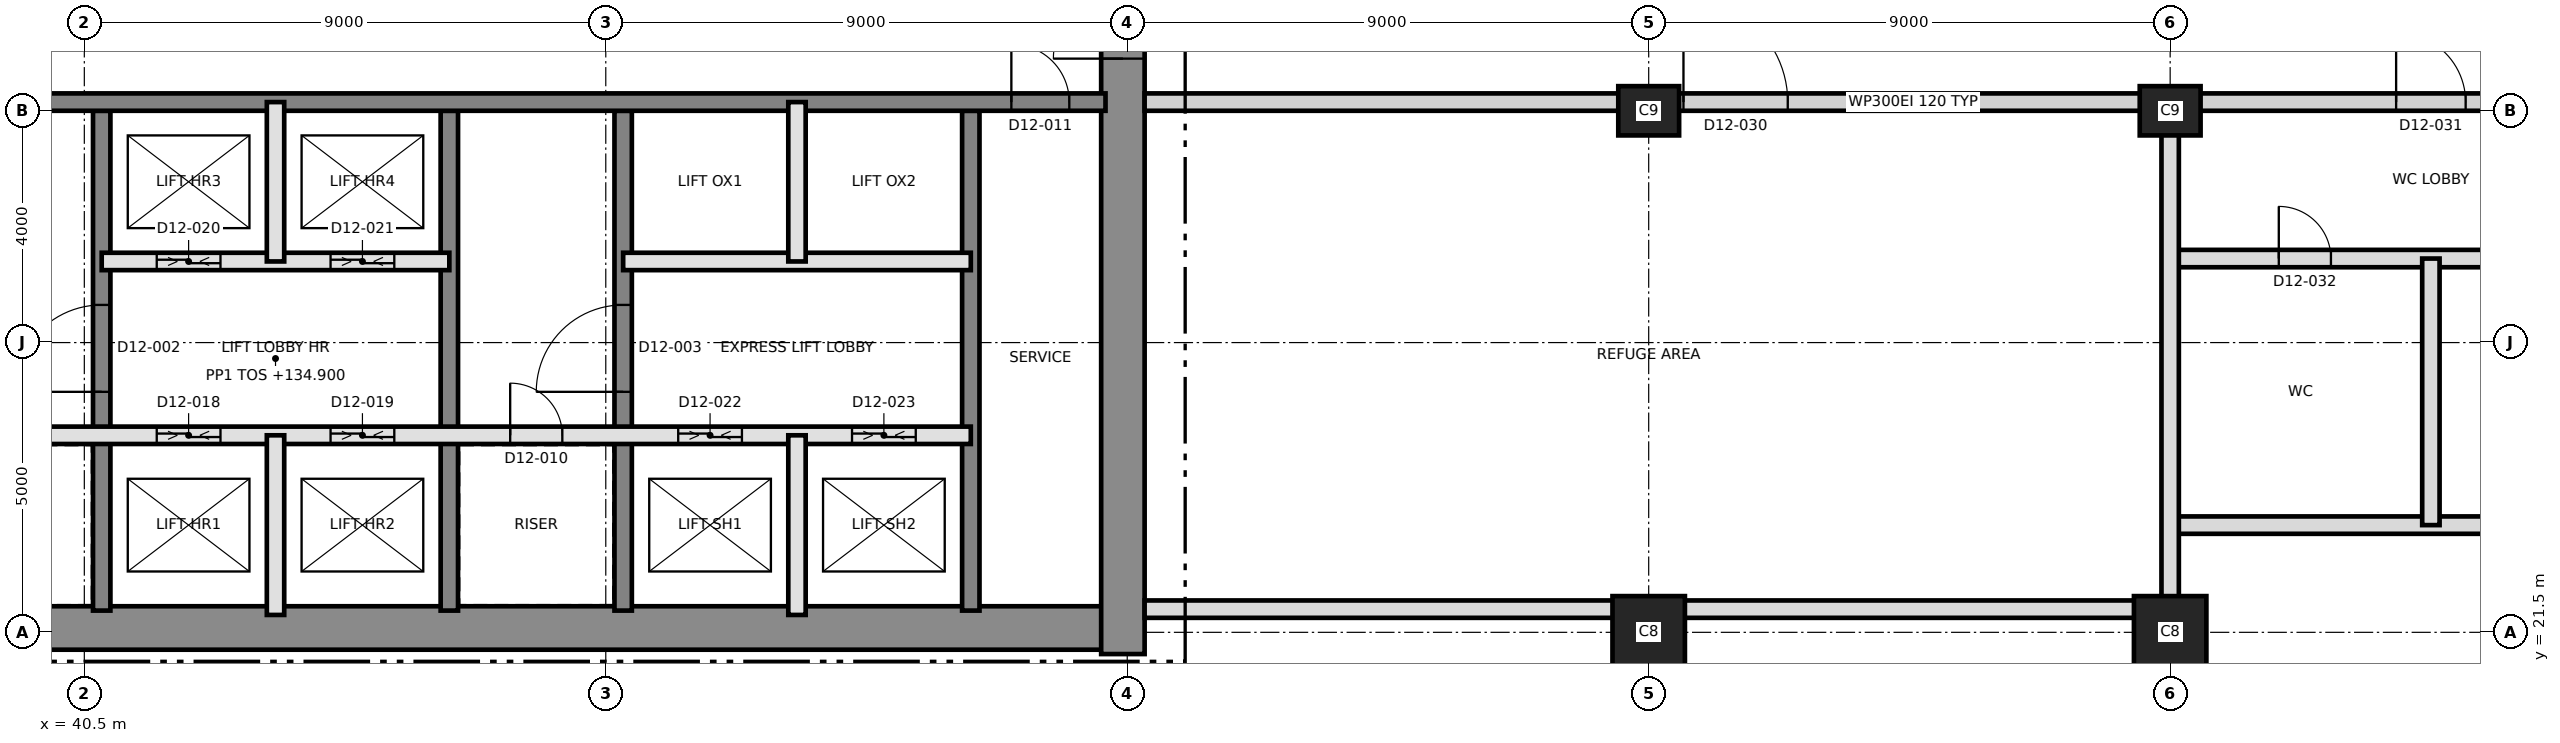
"""IFC4 building model, lengths in metres.
Left out: names, types, materials, properties, quantities, classifications, styles, units other than length and angle.
Written with IfcOpenShell. Run it as: python <this file> out.ifc"""

import sys

from ifc_helpers import new_model, si_unit, direction, frame, frame_2d, origin, origin_2d, place, context, subcontext, project, spatial, rectangle, extrude, element, fill, save


model = new_model("IFC4")
c1 = context("Model", 3, precision=1e-05, world=origin(), true_north=direction((0.0, 1.0)))
c2 = subcontext(c1, "Body", "Model", "MODEL_VIEW")
j1 = project(units=[si_unit("LENGTHUNIT", "METRE"), si_unit("PLANEANGLEUNIT", "RADIAN")], contexts=[c1])
p1 = place(None, origin())
s1 = spatial("IfcSite", under=j1, at=p1, CompositionType="ELEMENT")
p2 = place(p1, origin())
s2 = spatial("IfcBuilding", under=s1, at=p2, CompositionType="ELEMENT")
p3 = place(p2, frame((0.0, 0.0, 135.2)))
s3 = spatial("IfcBuildingStorey", under=s2, at=p3, CompositionType="ELEMENT", Elevation=135.2)
p4 = place(p3, frame((31.125, 21.575, 0.0), z_axis=(0.0, 0.0, 1.0), x_axis=(1.0, 0.0, 0.0)))
e1 = element("IfcWall", 1, at=p4, inside=s3, PredefinedType="SHEAR", context=c2, shape_type="SweptSolid", body=[
    extrude(rectangle(XDim=27.0, YDim=0.75, at=frame_2d((13.5, 0.0))), origin(), (0.0, 0.0, 1.0), 7.0),
])
p5 = place(p3, frame((58.425, 21.125, 0.0), z_axis=(0.0, 0.0, 1.0), x_axis=(0.0, 1.0, 0.0)))
e2 = element("IfcWall", 2, at=p5, inside=s3, PredefinedType="SHEAR", context=c2, shape_type="SweptSolid", body=[
    extrude(rectangle(XDim=18.75, YDim=0.75, at=frame_2d((9.375, 0.0))), origin(), (0.0, 0.0, 1.0), 7.0),
])
p6 = place(p5, frame((10.275, 0.0, 0.0)))
e3 = element("IfcOpeningElement", 3, at=p6, cuts=e2, PredefinedType="OPENING", context=c2, shape_type="SweptSolid", body=[
    extrude(rectangle(XDim=1.2, YDim=2.1, at=frame_2d((0.6, 1.05))), frame((0.0, 0.385, 0.0), z_axis=(0.0, -1.0, 0.0), x_axis=(1.0, 0.0, 0.0)), (0.0, 0.0, 1.0), 0.77),
])
p7 = place(p3, frame((40.8, 21.875, 0.0), z_axis=(0.0, 0.0, 1.0), x_axis=(0.0, 1.0, 0.0)))
e4 = element("IfcWall", 4, at=p7, inside=s3, PredefinedType="SHEAR", context=c2, shape_type="SweptSolid", body=[
    extrude(rectangle(XDim=8.625, YDim=0.3, at=frame_2d((4.312, 0.0))), origin(), (0.0, 0.0, 1.0), 7.0),
])
p8 = place(p7, frame((3.775, 0.0, 0.0)))
e5 = element("IfcOpeningElement", 5, at=p8, cuts=e4, PredefinedType="OPENING", context=c2, shape_type="SweptSolid", body=[
    extrude(rectangle(XDim=1.5, YDim=2.1, at=frame_2d((0.75, 1.05))), frame((0.0, 0.16, 0.0), z_axis=(0.0, -1.0, 0.0), x_axis=(1.0, 0.0, 0.0)), (0.0, 0.0, 1.0), 0.32),
])
p9 = place(p3, frame((46.8, 21.875, 0.0), z_axis=(0.0, 0.0, 1.0), x_axis=(0.0, 1.0, 0.0)))
e6 = element("IfcWall", 6, at=p9, inside=s3, PredefinedType="SHEAR", context=c2, shape_type="SweptSolid", body=[
    extrude(rectangle(XDim=8.625, YDim=0.3, at=frame_2d((4.312, 0.0))), origin(), (0.0, 0.0, 1.0), 7.0),
])
p10 = place(p3, frame((49.8, 21.875, 0.0), z_axis=(0.0, 0.0, 1.0), x_axis=(0.0, 1.0, 0.0)))
e7 = element("IfcWall", 7, at=p10, inside=s3, PredefinedType="SHEAR", context=c2, shape_type="SweptSolid", body=[
    extrude(rectangle(XDim=8.625, YDim=0.3, at=frame_2d((4.312, 0.0))), origin(), (0.0, 0.0, 1.0), 7.0),
])
p11 = place(p10, frame((3.775, 0.0, 0.0)))
e8 = element("IfcOpeningElement", 8, at=p11, cuts=e7, PredefinedType="OPENING", context=c2, shape_type="SweptSolid", body=[
    extrude(rectangle(XDim=1.5, YDim=2.1, at=frame_2d((0.75, 1.05))), frame((0.0, 0.16, 0.0), z_axis=(0.0, -1.0, 0.0), x_axis=(1.0, 0.0, 0.0)), (0.0, 0.0, 1.0), 0.32),
])
p12 = place(p3, frame((55.8, 21.875, 0.0), z_axis=(0.0, 0.0, 1.0), x_axis=(0.0, 1.0, 0.0)))
e9 = element("IfcWall", 9, at=p12, inside=s3, PredefinedType="SHEAR", context=c2, shape_type="SweptSolid", body=[
    extrude(rectangle(XDim=8.625, YDim=0.3, at=frame_2d((4.312, 0.0))), origin(), (0.0, 0.0, 1.0), 7.0),
])
p13 = place(p3, frame((31.875, 30.65, 0.0), z_axis=(0.0, 0.0, 1.0), x_axis=(1.0, 0.0, 0.0)))
e10 = element("IfcWall", 10, at=p13, inside=s3, PredefinedType="SHEAR", context=c2, shape_type="SweptSolid", body=[
    extrude(rectangle(XDim=26.25, YDim=0.3, at=frame_2d((13.125, 0.0))), origin(), (0.0, 0.0, 1.0), 7.0),
])
p14 = place(p13, frame((24.625, 0.0, 0.0)))
e11 = element("IfcOpeningElement", 11, at=p14, cuts=e10, PredefinedType="OPENING", context=c2, shape_type="SweptSolid", body=[
    extrude(rectangle(XDim=1.0, YDim=2.1, at=frame_2d((0.5, 1.05))), frame((0.0, 0.16, 0.0), z_axis=(0.0, -1.0, 0.0), x_axis=(1.0, 0.0, 0.0)), (0.0, 0.0, 1.0), 0.32),
])
for number, where, z_axis, x_axis in (
    (12, (67.5, 21.5, 0.0), (0.0, 0.0, 1.0), (1.0, 0.0, 0.0)),
    (13, (76.5, 21.5, 0.0), (0.0, 0.0, 1.0), (1.0, 0.0, 0.0)),
):
    element("IfcColumn", number, at=place(p3, frame(where, z_axis=z_axis, x_axis=x_axis)), inside=s3, PredefinedType="COLUMN", context=c2, shape_type="SweptSolid", body=[
        extrude(rectangle(XDim=1.25, YDim=1.25, at=origin_2d()), origin(), (0.0, 0.0, 1.0), 7.0),
    ])
for number, where, z_axis, x_axis in (
    (14, (67.5, 30.5, 0.0), (0.0, 0.0, 1.0), (1.0, 0.0, 0.0)),
    (15, (76.5, 30.5, 0.0), (0.0, 0.0, 1.0), (1.0, 0.0, 0.0)),
):
    element("IfcColumn", number, at=place(p3, frame(where, z_axis=z_axis, x_axis=x_axis)), inside=s3, PredefinedType="COLUMN", context=c2, shape_type="SweptSolid", body=[
        extrude(rectangle(XDim=1.05, YDim=0.85, at=origin_2d()), origin(), (0.0, 0.0, 1.0), 7.0),
    ])
p15 = place(p3, frame((31.8, 24.9, 0.0), z_axis=(0.0, 0.0, 1.0), x_axis=(1.0, 0.0, 0.0)))
e16 = element("IfcWall", 16, at=p15, inside=s3, PredefinedType="SOLIDWALL", context=c2, shape_type="SweptSolid", body=[
    extrude(rectangle(XDim=24.0, YDim=0.3, at=frame_2d((12.0, 0.0))), origin(), (0.0, 0.0, 1.0), 6.7),
])
p16 = place(p15, frame((7.05, 0.0, 0.0)))
e17 = element("IfcOpeningElement", 17, at=p16, cuts=e16, PredefinedType="OPENING", context=c2, shape_type="SweptSolid", body=[
    extrude(rectangle(XDim=0.9, YDim=2.1, at=frame_2d((0.45, 1.05))), frame((0.0, 0.16, 0.0), z_axis=(0.0, -1.0, 0.0), x_axis=(1.0, 0.0, 0.0)), (0.0, 0.0, 1.0), 0.32),
])
p17 = place(p15, frame((16.05, 0.0, 0.0)))
e18 = element("IfcOpeningElement", 18, at=p17, cuts=e16, PredefinedType="OPENING", context=c2, shape_type="SweptSolid", body=[
    extrude(rectangle(XDim=0.9, YDim=2.1, at=frame_2d((0.45, 1.05))), frame((0.0, 0.16, 0.0), z_axis=(0.0, -1.0, 0.0), x_axis=(1.0, 0.0, 0.0)), (0.0, 0.0, 1.0), 0.32),
])
p18 = place(p15, frame((0.95, 0.0, 0.0)))
e19 = element("IfcOpeningElement", 19, at=p18, cuts=e16, PredefinedType="OPENING", context=c2, shape_type="SweptSolid", body=[
    extrude(rectangle(XDim=1.1, YDim=2.4, at=frame_2d((0.55, 1.2))), frame((0.0, 0.16, 0.0), z_axis=(0.0, -1.0, 0.0), x_axis=(1.0, 0.0, 0.0)), (0.0, 0.0, 1.0), 0.32),
])
p19 = place(p15, frame((3.95, 0.0, 0.0)))
e20 = element("IfcOpeningElement", 20, at=p19, cuts=e16, PredefinedType="OPENING", context=c2, shape_type="SweptSolid", body=[
    extrude(rectangle(XDim=1.1, YDim=2.4, at=frame_2d((0.55, 1.2))), frame((0.0, 0.16, 0.0), z_axis=(0.0, -1.0, 0.0), x_axis=(1.0, 0.0, 0.0)), (0.0, 0.0, 1.0), 0.32),
])
p20 = place(p15, frame((9.95, 0.0, 0.0)))
e21 = element("IfcOpeningElement", 21, at=p20, cuts=e16, PredefinedType="OPENING", context=c2, shape_type="SweptSolid", body=[
    extrude(rectangle(XDim=1.1, YDim=2.4, at=frame_2d((0.55, 1.2))), frame((0.0, 0.16, 0.0), z_axis=(0.0, -1.0, 0.0), x_axis=(1.0, 0.0, 0.0)), (0.0, 0.0, 1.0), 0.32),
])
p21 = place(p15, frame((12.95, 0.0, 0.0)))
e22 = element("IfcOpeningElement", 22, at=p21, cuts=e16, PredefinedType="OPENING", context=c2, shape_type="SweptSolid", body=[
    extrude(rectangle(XDim=1.1, YDim=2.4, at=frame_2d((0.55, 1.2))), frame((0.0, 0.16, 0.0), z_axis=(0.0, -1.0, 0.0), x_axis=(1.0, 0.0, 0.0)), (0.0, 0.0, 1.0), 0.32),
])
p22 = place(p15, frame((18.95, 0.0, 0.0)))
e23 = element("IfcOpeningElement", 23, at=p22, cuts=e16, PredefinedType="OPENING", context=c2, shape_type="SweptSolid", body=[
    extrude(rectangle(XDim=1.1, YDim=2.4, at=frame_2d((0.55, 1.2))), frame((0.0, 0.16, 0.0), z_axis=(0.0, -1.0, 0.0), x_axis=(1.0, 0.0, 0.0)), (0.0, 0.0, 1.0), 0.32),
])
p23 = place(p15, frame((21.95, 0.0, 0.0)))
e24 = element("IfcOpeningElement", 24, at=p23, cuts=e16, PredefinedType="OPENING", context=c2, shape_type="SweptSolid", body=[
    extrude(rectangle(XDim=1.1, YDim=2.4, at=frame_2d((0.55, 1.2))), frame((0.0, 0.16, 0.0), z_axis=(0.0, -1.0, 0.0), x_axis=(1.0, 0.0, 0.0)), (0.0, 0.0, 1.0), 0.32),
])
p24 = place(p3, frame((40.8, 27.9, 0.0), z_axis=(0.0, 0.0, 1.0), x_axis=(1.0, 0.0, 0.0)))
e25 = element("IfcWall", 25, at=p24, inside=s3, PredefinedType="SOLIDWALL", context=c2, shape_type="SweptSolid", body=[
    extrude(rectangle(XDim=6.0, YDim=0.3, at=frame_2d((3.0, 0.0))), origin(), (0.0, 0.0, 1.0), 6.7),
])
p25 = place(p24, frame((0.95, 0.0, 0.0)))
e26 = element("IfcOpeningElement", 26, at=p25, cuts=e25, PredefinedType="OPENING", context=c2, shape_type="SweptSolid", body=[
    extrude(rectangle(XDim=1.1, YDim=2.4, at=frame_2d((0.55, 1.2))), frame((0.0, 0.16, 0.0), z_axis=(0.0, -1.0, 0.0), x_axis=(1.0, 0.0, 0.0)), (0.0, 0.0, 1.0), 0.32),
])
p26 = place(p24, frame((3.95, 0.0, 0.0)))
e27 = element("IfcOpeningElement", 27, at=p26, cuts=e25, PredefinedType="OPENING", context=c2, shape_type="SweptSolid", body=[
    extrude(rectangle(XDim=1.1, YDim=2.4, at=frame_2d((0.55, 1.2))), frame((0.0, 0.16, 0.0), z_axis=(0.0, -1.0, 0.0), x_axis=(1.0, 0.0, 0.0)), (0.0, 0.0, 1.0), 0.32),
])
p27 = place(p3, frame((49.8, 27.9, 0.0), z_axis=(0.0, 0.0, 1.0), x_axis=(1.0, 0.0, 0.0)))
e28 = element("IfcWall", 28, at=p27, inside=s3, PredefinedType="SOLIDWALL", context=c2, shape_type="SweptSolid", body=[
    extrude(rectangle(XDim=6.0, YDim=0.3, at=frame_2d((3.0, 0.0))), origin(), (0.0, 0.0, 1.0), 6.7),
])
p28 = place(p3, frame((43.8, 21.8, 0.0), z_axis=(0.0, 0.0, 1.0), x_axis=(0.0, 1.0, 0.0)))
e29 = element("IfcWall", 29, at=p28, inside=s3, PredefinedType="SOLIDWALL", context=c2, shape_type="SweptSolid", body=[
    extrude(rectangle(XDim=3.1, YDim=0.3, at=frame_2d((1.55, 0.0))), origin(), (0.0, 0.0, 1.0), 6.7),
])
p29 = place(p3, frame((43.8, 27.9, 0.0), z_axis=(0.0, 0.0, 1.0), x_axis=(0.0, 1.0, 0.0)))
e30 = element("IfcWall", 30, at=p29, inside=s3, PredefinedType="SOLIDWALL", context=c2, shape_type="SweptSolid", body=[
    extrude(rectangle(XDim=2.75, YDim=0.3, at=frame_2d((1.375, 0.0))), origin(), (0.0, 0.0, 1.0), 6.7),
])
p30 = place(p3, frame((52.8, 21.8, 0.0), z_axis=(0.0, 0.0, 1.0), x_axis=(0.0, 1.0, 0.0)))
e31 = element("IfcWall", 31, at=p30, inside=s3, PredefinedType="SOLIDWALL", context=c2, shape_type="SweptSolid", body=[
    extrude(rectangle(XDim=3.1, YDim=0.3, at=frame_2d((1.55, 0.0))), origin(), (0.0, 0.0, 1.0), 6.7),
])
p31 = place(p3, frame((52.8, 27.9, 0.0), z_axis=(0.0, 0.0, 1.0), x_axis=(0.0, 1.0, 0.0)))
e32 = element("IfcWall", 32, at=p31, inside=s3, PredefinedType="SOLIDWALL", context=c2, shape_type="SweptSolid", body=[
    extrude(rectangle(XDim=2.75, YDim=0.3, at=frame_2d((1.375, 0.0))), origin(), (0.0, 0.0, 1.0), 6.7),
])
p32 = place(p3, frame((58.8, 21.9, 0.0), z_axis=(0.0, 0.0, 1.0), x_axis=(1.0, 0.0, 0.0)))
e33 = element("IfcWall", 33, at=p32, inside=s3, PredefinedType="PARTITIONING", context=c2, shape_type="SweptSolid", body=[
    extrude(rectangle(XDim=17.7, YDim=0.3, at=frame_2d((8.85, 0.0))), origin(), (0.0, 0.0, 1.0), 6.7),
])
p33 = place(p3, frame((76.5, 23.35, 0.0), z_axis=(0.0, 0.0, 1.0), x_axis=(1.0, 0.0, 0.0)))
e34 = element("IfcWall", 34, at=p33, inside=s3, PredefinedType="PARTITIONING", context=c2, shape_type="SweptSolid", body=[
    extrude(rectangle(XDim=8.83, YDim=0.3, at=frame_2d((4.415, 0.0))), origin(), (0.0, 0.0, 1.0), 6.7),
])
p34 = place(p3, frame((76.5, 27.95, 0.0), z_axis=(0.0, 0.0, 1.0), x_axis=(1.0, 0.0, 0.0)))
e35 = element("IfcWall", 35, at=p34, inside=s3, PredefinedType="PARTITIONING", context=c2, shape_type="SweptSolid", body=[
    extrude(rectangle(XDim=8.83, YDim=0.3, at=frame_2d((4.415, 0.0))), origin(), (0.0, 0.0, 1.0), 6.7),
])
p35 = place(p34, frame((1.875, 0.0, 0.0)))
e36 = element("IfcOpeningElement", 36, at=p35, cuts=e35, PredefinedType="OPENING", context=c2, shape_type="SweptSolid", body=[
    extrude(rectangle(XDim=0.9, YDim=2.1, at=frame_2d((0.45, 1.05))), frame((0.0, 0.16, 0.0), z_axis=(0.0, -1.0, 0.0), x_axis=(1.0, 0.0, 0.0)), (0.0, 0.0, 1.0), 0.32),
])
p36 = place(p34, frame((6.225, 0.0, 0.0)))
e37 = element("IfcOpeningElement", 37, at=p36, cuts=e35, PredefinedType="OPENING", context=c2, shape_type="SweptSolid", body=[
    extrude(rectangle(XDim=0.9, YDim=2.1, at=frame_2d((0.45, 1.05))), frame((0.0, 0.16, 0.0), z_axis=(0.0, -1.0, 0.0), x_axis=(1.0, 0.0, 0.0)), (0.0, 0.0, 1.0), 0.32),
])
p37 = place(p3, frame((58.8, 30.65, 0.0), z_axis=(0.0, 0.0, 1.0), x_axis=(1.0, 0.0, 0.0)))
e38 = element("IfcWall", 38, at=p37, inside=s3, PredefinedType="PARTITIONING", context=c2, shape_type="SweptSolid", body=[
    extrude(rectangle(XDim=26.53, YDim=0.3, at=frame_2d((13.265, 0.0))), origin(), (0.0, 0.0, 1.0), 6.7),
])
p38 = place(p37, frame((9.3, 0.0, 0.0)))
e39 = element("IfcOpeningElement", 39, at=p38, cuts=e38, PredefinedType="OPENING", context=c2, shape_type="SweptSolid", body=[
    extrude(rectangle(XDim=1.8, YDim=2.1, at=frame_2d((0.9, 1.05))), frame((0.0, 0.16, 0.0), z_axis=(0.0, -1.0, 0.0), x_axis=(1.0, 0.0, 0.0)), (0.0, 0.0, 1.0), 0.32),
])
p39 = place(p37, frame((21.6, 0.0, 0.0)))
e40 = element("IfcOpeningElement", 40, at=p39, cuts=e38, PredefinedType="OPENING", context=c2, shape_type="SweptSolid", body=[
    extrude(rectangle(XDim=1.2, YDim=2.1, at=frame_2d((0.6, 1.05))), frame((0.0, 0.16, 0.0), z_axis=(0.0, -1.0, 0.0), x_axis=(1.0, 0.0, 0.0)), (0.0, 0.0, 1.0), 0.32),
])
p40 = place(p3, frame((76.5, 21.9, 0.0), z_axis=(0.0, 0.0, 1.0), x_axis=(0.0, 1.0, 0.0)))
e41 = element("IfcWall", 41, at=p40, inside=s3, PredefinedType="PARTITIONING", context=c2, shape_type="SweptSolid", body=[
    extrude(rectangle(XDim=8.75, YDim=0.3, at=frame_2d((4.375, 0.0))), origin(), (0.0, 0.0, 1.0), 6.7),
])
p41 = place(p3, frame((81.0, 23.35, 0.0), z_axis=(0.0, 0.0, 1.0), x_axis=(0.0, 1.0, 0.0)))
e42 = element("IfcWall", 42, at=p41, inside=s3, PredefinedType="PARTITIONING", context=c2, shape_type="SweptSolid", body=[
    extrude(rectangle(XDim=4.6, YDim=0.3, at=frame_2d((2.3, 0.0))), origin(), (0.0, 0.0, 1.0), 6.7),
])
p42 = place(p8, origin())
e43 = element("IfcDoor", 43, at=p42, inside=s3, OperationType="SINGLE_SWING_RIGHT", PredefinedType="DOOR", context=c2, shape_type="SweptSolid", body=[
    extrude(rectangle(XDim=1.5, YDim=2.1, at=frame_2d((0.75, 1.05))), frame((0.0, 0.025, 0.0), z_axis=(0.0, -1.0, 0.0), x_axis=(1.0, 0.0, 0.0)), (0.0, 0.0, 1.0), 0.05),
])
fill(e5, e43)
p43 = place(p11, origin())
e44 = element("IfcDoor", 44, at=p43, inside=s3, OperationType="SINGLE_SWING_LEFT", PredefinedType="DOOR", context=c2, shape_type="SweptSolid", body=[
    extrude(rectangle(XDim=1.5, YDim=2.1, at=frame_2d((0.75, 1.05))), frame((0.0, 0.025, 0.0), z_axis=(0.0, -1.0, 0.0), x_axis=(1.0, 0.0, 0.0)), (0.0, 0.0, 1.0), 0.05),
])
fill(e8, e44)
p44 = place(p17, origin())
e45 = element("IfcDoor", 45, at=p44, inside=s3, OperationType="SINGLE_SWING_RIGHT", PredefinedType="DOOR", context=c2, shape_type="SweptSolid", body=[
    extrude(rectangle(XDim=0.9, YDim=2.1, at=frame_2d((0.45, 1.05))), frame((0.0, 0.025, 0.0), z_axis=(0.0, -1.0, 0.0), x_axis=(1.0, 0.0, 0.0)), (0.0, 0.0, 1.0), 0.05),
])
fill(e18, e45)
p45 = place(p14, origin())
e46 = element("IfcDoor", 46, at=p45, inside=s3, OperationType="SINGLE_SWING_LEFT", PredefinedType="DOOR", context=c2, shape_type="SweptSolid", body=[
    extrude(rectangle(XDim=1.0, YDim=2.1, at=frame_2d((0.5, 1.05))), frame((0.0, 0.025, 0.0), z_axis=(0.0, -1.0, 0.0), x_axis=(1.0, 0.0, 0.0)), (0.0, 0.0, 1.0), 0.05),
])
fill(e11, e46)
p46 = place(p6, origin())
e47 = element("IfcDoor", 47, at=p46, inside=s3, OperationType="SINGLE_SWING_LEFT", PredefinedType="DOOR", context=c2, shape_type="SweptSolid", body=[
    extrude(rectangle(XDim=1.2, YDim=2.1, at=frame_2d((0.6, 1.05))), frame((0.0, 0.025, 0.0), z_axis=(0.0, -1.0, 0.0), x_axis=(1.0, 0.0, 0.0)), (0.0, 0.0, 1.0), 0.05),
])
fill(e3, e47)
p47 = place(p20, origin())
e48 = element("IfcDoor", 48, at=p47, inside=s3, OperationType="SLIDING_TO_LEFT", PredefinedType="DOOR", context=c2, shape_type="SweptSolid", body=[
    extrude(rectangle(XDim=1.1, YDim=2.4, at=frame_2d((0.55, 1.2))), frame((0.0, 0.025, 0.0), z_axis=(0.0, -1.0, 0.0), x_axis=(1.0, 0.0, 0.0)), (0.0, 0.0, 1.0), 0.05),
])
fill(e21, e48)
p48 = place(p21, origin())
e49 = element("IfcDoor", 49, at=p48, inside=s3, OperationType="SLIDING_TO_LEFT", PredefinedType="DOOR", context=c2, shape_type="SweptSolid", body=[
    extrude(rectangle(XDim=1.1, YDim=2.4, at=frame_2d((0.55, 1.2))), frame((0.0, 0.025, 0.0), z_axis=(0.0, -1.0, 0.0), x_axis=(1.0, 0.0, 0.0)), (0.0, 0.0, 1.0), 0.05),
])
fill(e22, e49)
p49 = place(p25, origin())
e50 = element("IfcDoor", 50, at=p49, inside=s3, OperationType="SLIDING_TO_LEFT", PredefinedType="DOOR", context=c2, shape_type="SweptSolid", body=[
    extrude(rectangle(XDim=1.1, YDim=2.4, at=frame_2d((0.55, 1.2))), frame((0.0, 0.025, 0.0), z_axis=(0.0, -1.0, 0.0), x_axis=(1.0, 0.0, 0.0)), (0.0, 0.0, 1.0), 0.05),
])
fill(e26, e50)
p50 = place(p26, origin())
e51 = element("IfcDoor", 51, at=p50, inside=s3, OperationType="SLIDING_TO_LEFT", PredefinedType="DOOR", context=c2, shape_type="SweptSolid", body=[
    extrude(rectangle(XDim=1.1, YDim=2.4, at=frame_2d((0.55, 1.2))), frame((0.0, 0.025, 0.0), z_axis=(0.0, -1.0, 0.0), x_axis=(1.0, 0.0, 0.0)), (0.0, 0.0, 1.0), 0.05),
])
fill(e27, e51)
p51 = place(p22, origin())
e52 = element("IfcDoor", 52, at=p51, inside=s3, OperationType="SLIDING_TO_LEFT", PredefinedType="DOOR", context=c2, shape_type="SweptSolid", body=[
    extrude(rectangle(XDim=1.1, YDim=2.4, at=frame_2d((0.55, 1.2))), frame((0.0, 0.025, 0.0), z_axis=(0.0, -1.0, 0.0), x_axis=(1.0, 0.0, 0.0)), (0.0, 0.0, 1.0), 0.05),
])
fill(e23, e52)
p52 = place(p23, origin())
e53 = element("IfcDoor", 53, at=p52, inside=s3, OperationType="SLIDING_TO_LEFT", PredefinedType="DOOR", context=c2, shape_type="SweptSolid", body=[
    extrude(rectangle(XDim=1.1, YDim=2.4, at=frame_2d((0.55, 1.2))), frame((0.0, 0.025, 0.0), z_axis=(0.0, -1.0, 0.0), x_axis=(1.0, 0.0, 0.0)), (0.0, 0.0, 1.0), 0.05),
])
fill(e24, e53)
p53 = place(p38, origin())
e54 = element("IfcDoor", 54, at=p53, inside=s3, OperationType="SINGLE_SWING_LEFT", PredefinedType="DOOR", context=c2, shape_type="SweptSolid", body=[
    extrude(rectangle(XDim=1.8, YDim=2.1, at=frame_2d((0.9, 1.05))), frame((0.0, 0.025, 0.0), z_axis=(0.0, -1.0, 0.0), x_axis=(1.0, 0.0, 0.0)), (0.0, 0.0, 1.0), 0.05),
])
fill(e39, e54)
p54 = place(p39, origin())
e55 = element("IfcDoor", 55, at=p54, inside=s3, OperationType="SINGLE_SWING_LEFT", PredefinedType="DOOR", context=c2, shape_type="SweptSolid", body=[
    extrude(rectangle(XDim=1.2, YDim=2.1, at=frame_2d((0.6, 1.05))), frame((0.0, 0.025, 0.0), z_axis=(0.0, -1.0, 0.0), x_axis=(1.0, 0.0, 0.0)), (0.0, 0.0, 1.0), 0.05),
])
fill(e40, e55)
p55 = place(p35, origin())
e56 = element("IfcDoor", 56, at=p55, inside=s3, OperationType="SINGLE_SWING_LEFT", PredefinedType="DOOR", context=c2, shape_type="SweptSolid", body=[
    extrude(rectangle(XDim=0.9, YDim=2.1, at=frame_2d((0.45, 1.05))), frame((0.0, 0.025, 0.0), z_axis=(0.0, -1.0, 0.0), x_axis=(1.0, 0.0, 0.0)), (0.0, 0.0, 1.0), 0.05),
])
fill(e36, e56)
save(model, sys.argv[1])
